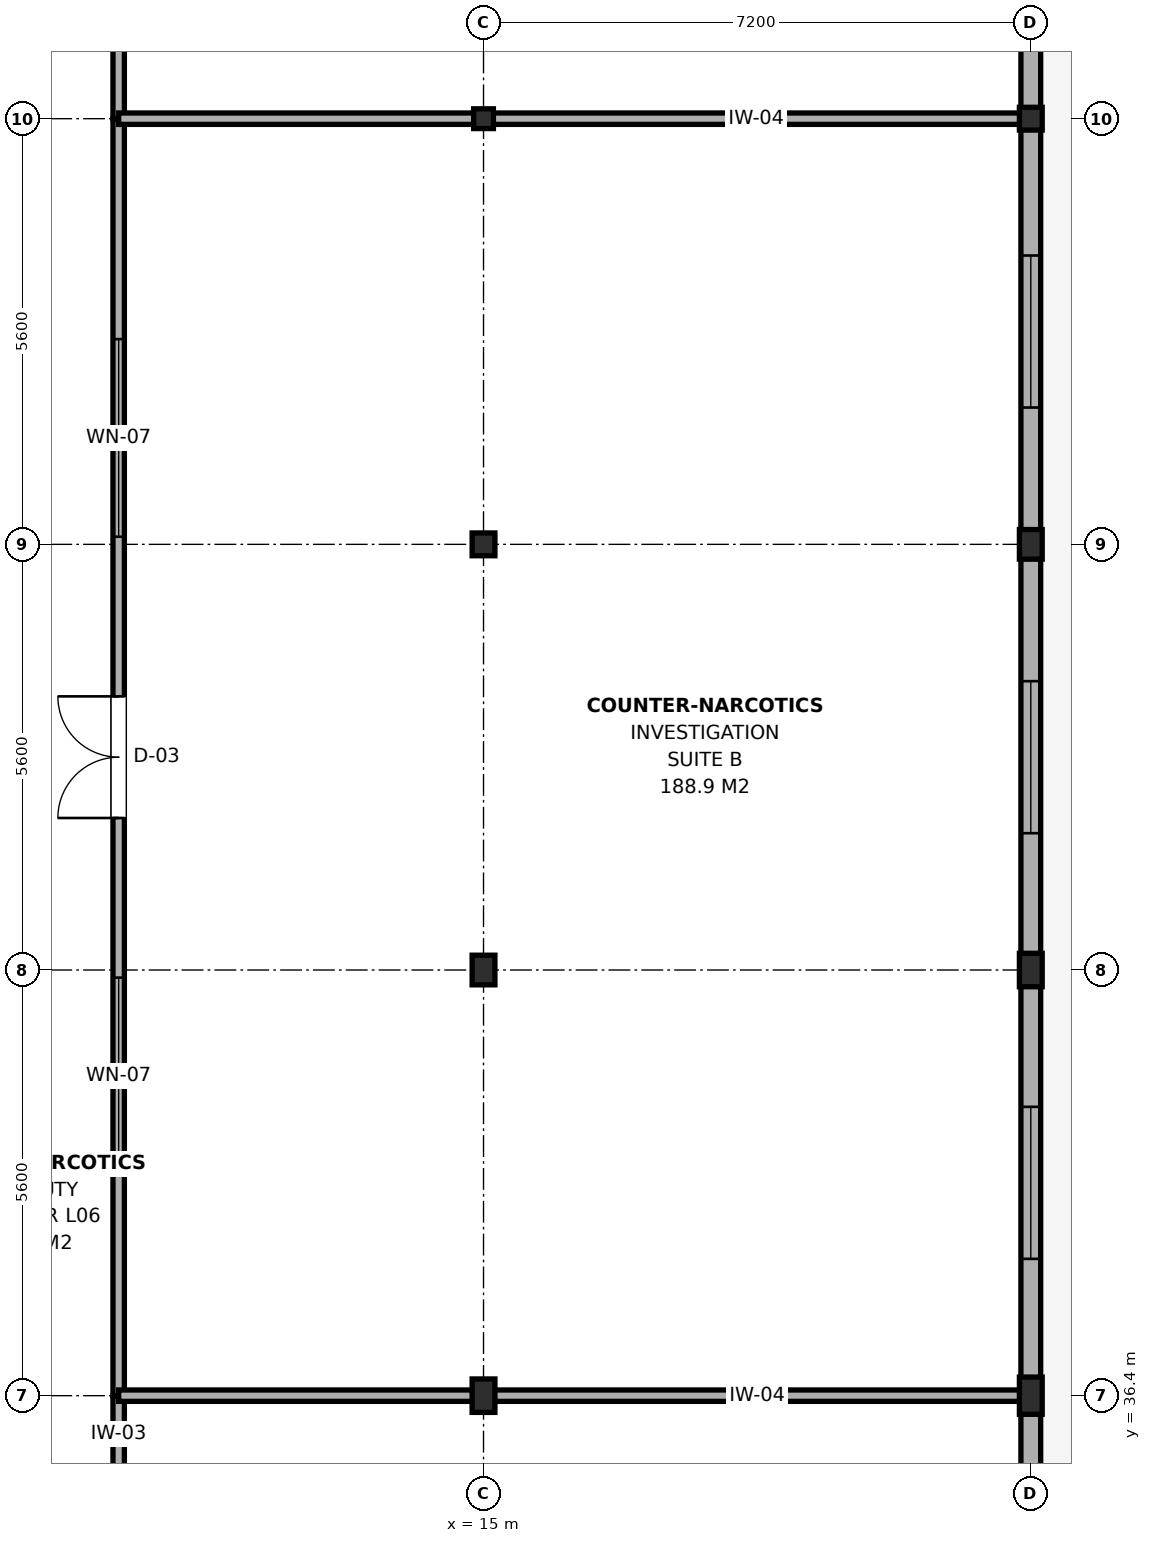
"""IFC4 building model, lengths in metres.
Left out: names, types, materials, properties, quantities, classifications, styles, units other than length and angle.
Written with IfcOpenShell. Run it as: python <this file> out.ifc"""

import sys

from ifc_helpers import new_model, si_unit, direction, frame, frame_2d, origin, origin_2d, place, context, subcontext, project, spatial, rectangle, i_section, extrude, element, fill, save


model = new_model("IFC4")
c1 = context("Model", 3, precision=1e-05, world=origin(), true_north=direction((0.0, 1.0)))
c2 = subcontext(c1, "Body", "Model", "MODEL_VIEW")
j1 = project(units=[si_unit("LENGTHUNIT", "METRE"), si_unit("PLANEANGLEUNIT", "RADIAN")], contexts=[c1])
p1 = place(None, origin())
s1 = spatial("IfcSite", under=j1, at=p1, CompositionType="ELEMENT")
p2 = place(p1, origin())
s2 = spatial("IfcBuilding", under=s1, at=p2, CompositionType="ELEMENT")
p3 = place(p2, frame((0.0, 0.0, 24.9)))
s3 = spatial("IfcBuildingStorey", under=s2, at=p3, CompositionType="ELEMENT", Elevation=24.9)
p4 = place(p3, frame((15.0, 36.4, 0.0), z_axis=(0.0, 0.0, 1.0), x_axis=(1.0, 0.0, 0.0)))
e1 = element("IfcColumn", 1, at=p4, inside=s3, PredefinedType="COLUMN", context=c2, shape_type="SweptSolid", body=[
    extrude(i_section(OverallWidth=0.3, OverallDepth=0.44, WebThickness=0.011, FlangeThickness=0.021, FilletRadius=0.027, at=origin_2d()), origin(), (0.0, 0.0, 1.0), 3.9),
])
p5 = place(p3, frame((15.0, 42.0, 0.0), z_axis=(0.0, 0.0, 1.0), x_axis=(1.0, 0.0, 0.0)))
e2 = element("IfcColumn", 2, at=p5, inside=s3, PredefinedType="COLUMN", context=c2, shape_type="SweptSolid", body=[
    extrude(i_section(OverallWidth=0.3, OverallDepth=0.39, WebThickness=0.011, FlangeThickness=0.019, FilletRadius=0.027, at=origin_2d()), origin(), (0.0, 0.0, 1.0), 3.9),
])
p6 = place(p3, frame((15.0, 47.6, 0.0), z_axis=(0.0, 0.0, 1.0), x_axis=(1.0, 0.0, 0.0)))
e3 = element("IfcColumn", 3, at=p6, inside=s3, PredefinedType="COLUMN", context=c2, shape_type="SweptSolid", body=[
    extrude(i_section(OverallWidth=0.3, OverallDepth=0.3, WebThickness=0.011, FlangeThickness=0.019, FilletRadius=0.027, at=origin_2d()), origin(), (0.0, 0.0, 1.0), 3.9),
])
p7 = place(p3, frame((15.0, 53.2, 0.0), z_axis=(0.0, 0.0, 1.0), x_axis=(1.0, 0.0, 0.0)))
e4 = element("IfcColumn", 4, at=p7, inside=s3, PredefinedType="COLUMN", context=c2, shape_type="SweptSolid", body=[
    extrude(i_section(OverallWidth=0.26, OverallDepth=0.26, WebThickness=0.01, FlangeThickness=0.018, FilletRadius=0.024, at=origin_2d()), origin(), (0.0, 0.0, 1.0), 3.9),
])
p8 = place(p3, frame((22.2, 36.4, 0.0), z_axis=(0.0, 0.0, 1.0), x_axis=(1.0, 0.0, 0.0)))
e5 = element("IfcColumn", 5, at=p8, inside=s3, PredefinedType="COLUMN", context=c2, shape_type="SweptSolid", body=[
    extrude(i_section(OverallWidth=0.3, OverallDepth=0.49, WebThickness=0.012, FlangeThickness=0.023, FilletRadius=0.027, at=origin_2d()), origin(), (0.0, 0.0, 1.0), 3.9),
])
p9 = place(p3, frame((22.2, 42.0, 0.0), z_axis=(0.0, 0.0, 1.0), x_axis=(1.0, 0.0, 0.0)))
e6 = element("IfcColumn", 6, at=p9, inside=s3, PredefinedType="COLUMN", context=c2, shape_type="SweptSolid", body=[
    extrude(i_section(OverallWidth=0.3, OverallDepth=0.44, WebThickness=0.011, FlangeThickness=0.021, FilletRadius=0.027, at=origin_2d()), origin(), (0.0, 0.0, 1.0), 3.9),
])
p10 = place(p3, frame((22.2, 47.6, 0.0), z_axis=(0.0, 0.0, 1.0), x_axis=(1.0, 0.0, 0.0)))
e7 = element("IfcColumn", 7, at=p10, inside=s3, PredefinedType="COLUMN", context=c2, shape_type="SweptSolid", body=[
    extrude(i_section(OverallWidth=0.3, OverallDepth=0.39, WebThickness=0.011, FlangeThickness=0.019, FilletRadius=0.027, at=origin_2d()), origin(), (0.0, 0.0, 1.0), 3.9),
])
p11 = place(p3, frame((22.2, 53.2, 0.0), z_axis=(0.0, 0.0, 1.0), x_axis=(1.0, 0.0, 0.0)))
e8 = element("IfcColumn", 8, at=p11, inside=s3, PredefinedType="COLUMN", context=c2, shape_type="SweptSolid", body=[
    extrude(i_section(OverallWidth=0.3, OverallDepth=0.3, WebThickness=0.011, FlangeThickness=0.019, FilletRadius=0.027, at=origin_2d()), origin(), (0.0, 0.0, 1.0), 3.9),
])
p12 = place(p3, frame((22.2, 30.8, 0.0), z_axis=(0.0, 0.0, 1.0), x_axis=(0.0, 1.0, 0.0)))
e9 = element("IfcWall", 9, at=p12, inside=s3, PredefinedType="SOLIDWALL", context=c2, shape_type="SweptSolid", body=[
    extrude(rectangle(XDim=5.6, YDim=0.26, at=frame_2d((2.8, 0.0))), origin(), (0.0, 0.0, 1.0), 3.115),
])
p13 = place(p12, frame((1.8, 0.0, 0.9)))
e10 = element("IfcOpeningElement", 10, at=p13, cuts=e9, PredefinedType="OPENING", context=c2, shape_type="SweptSolid", body=[
    extrude(rectangle(XDim=2.0, YDim=1.8, at=frame_2d((1.0, 0.9))), frame((0.0, 0.145, 0.0), z_axis=(0.0, -1.0, 0.0), x_axis=(1.0, 0.0, 0.0)), (0.0, 0.0, 1.0), 0.29),
])
p14 = place(p3, frame((22.2, 36.4, 0.0), z_axis=(0.0, 0.0, 1.0), x_axis=(0.0, 1.0, 0.0)))
e11 = element("IfcWall", 11, at=p14, inside=s3, PredefinedType="SOLIDWALL", context=c2, shape_type="SweptSolid", body=[
    extrude(rectangle(XDim=5.6, YDim=0.26, at=frame_2d((2.8, 0.0))), origin(), (0.0, 0.0, 1.0), 3.115),
])
p15 = place(p14, frame((1.8, 0.0, 0.9)))
e12 = element("IfcOpeningElement", 12, at=p15, cuts=e11, PredefinedType="OPENING", context=c2, shape_type="SweptSolid", body=[
    extrude(rectangle(XDim=2.0, YDim=1.8, at=frame_2d((1.0, 0.9))), frame((0.0, 0.145, 0.0), z_axis=(0.0, -1.0, 0.0), x_axis=(1.0, 0.0, 0.0)), (0.0, 0.0, 1.0), 0.29),
])
p16 = place(p3, frame((22.2, 42.0, 0.0), z_axis=(0.0, 0.0, 1.0), x_axis=(0.0, 1.0, 0.0)))
e13 = element("IfcWall", 13, at=p16, inside=s3, PredefinedType="SOLIDWALL", context=c2, shape_type="SweptSolid", body=[
    extrude(rectangle(XDim=5.6, YDim=0.26, at=frame_2d((2.8, 0.0))), origin(), (0.0, 0.0, 1.0), 3.115),
])
p17 = place(p16, frame((1.8, 0.0, 0.9)))
e14 = element("IfcOpeningElement", 14, at=p17, cuts=e13, PredefinedType="OPENING", context=c2, shape_type="SweptSolid", body=[
    extrude(rectangle(XDim=2.0, YDim=1.8, at=frame_2d((1.0, 0.9))), frame((0.0, 0.145, 0.0), z_axis=(0.0, -1.0, 0.0), x_axis=(1.0, 0.0, 0.0)), (0.0, 0.0, 1.0), 0.29),
])
p18 = place(p3, frame((22.2, 47.6, 0.0), z_axis=(0.0, 0.0, 1.0), x_axis=(0.0, 1.0, 0.0)))
e15 = element("IfcWall", 15, at=p18, inside=s3, PredefinedType="SOLIDWALL", context=c2, shape_type="SweptSolid", body=[
    extrude(rectangle(XDim=5.6, YDim=0.26, at=frame_2d((2.8, 0.0))), origin(), (0.0, 0.0, 1.0), 3.165),
])
p19 = place(p18, frame((1.8, 0.0, 0.9)))
e16 = element("IfcOpeningElement", 16, at=p19, cuts=e15, PredefinedType="OPENING", context=c2, shape_type="SweptSolid", body=[
    extrude(rectangle(XDim=2.0, YDim=1.8, at=frame_2d((1.0, 0.9))), frame((0.0, 0.145, 0.0), z_axis=(0.0, -1.0, 0.0), x_axis=(1.0, 0.0, 0.0)), (0.0, 0.0, 1.0), 0.29),
])
p20 = place(p3, frame((22.2, 53.2, 0.0), z_axis=(0.0, 0.0, 1.0), x_axis=(0.0, 1.0, 0.0)))
e17 = element("IfcWall", 17, at=p20, inside=s3, PredefinedType="SOLIDWALL", context=c2, shape_type="SweptSolid", body=[
    extrude(rectangle(XDim=5.6, YDim=0.26, at=frame_2d((2.8, 0.0))), origin(), (0.0, 0.0, 1.0), 3.215),
])
p21 = place(p20, frame((1.8, 0.0, 0.9)))
e18 = element("IfcOpeningElement", 18, at=p21, cuts=e17, PredefinedType="OPENING", context=c2, shape_type="SweptSolid", body=[
    extrude(rectangle(XDim=2.0, YDim=1.8, at=frame_2d((1.0, 0.9))), frame((0.0, 0.145, 0.0), z_axis=(0.0, -1.0, 0.0), x_axis=(1.0, 0.0, 0.0)), (0.0, 0.0, 1.0), 0.29),
])
p22 = place(p3, frame((10.2, 17.56, 0.0), z_axis=(0.0, 0.0, 1.0), x_axis=(0.0, 1.0, 0.0)))
e19 = element("IfcWall", 19, at=p22, inside=s3, PredefinedType="PARTITIONING", context=c2, shape_type="SweptSolid", body=[
    extrude(rectangle(XDim=18.84, YDim=0.15, at=frame_2d((9.42, 0.0))), origin(), (0.0, 0.0, 1.0), 3.165),
])
p23 = place(p22, frame((8.62, 0.0, 0.0)))
e20 = element("IfcOpeningElement", 20, at=p23, cuts=e19, PredefinedType="OPENING", context=c2, shape_type="SweptSolid", body=[
    extrude(rectangle(XDim=1.6, YDim=2.15, at=frame_2d((0.8, 1.075))), frame((0.0, 0.09, 0.0), z_axis=(0.0, -1.0, 0.0), x_axis=(1.0, 0.0, 0.0)), (0.0, 0.0, 1.0), 0.18),
])
p24 = place(p22, frame((3.41, 0.0, 0.95)))
e21 = element("IfcOpeningElement", 21, at=p24, cuts=e19, PredefinedType="OPENING", context=c2, shape_type="SweptSolid", body=[
    extrude(rectangle(XDim=2.6, YDim=1.5, at=frame_2d((1.3, 0.75))), frame((0.0, 0.09, 0.0), z_axis=(0.0, -1.0, 0.0), x_axis=(1.0, 0.0, 0.0)), (0.0, 0.0, 1.0), 0.18),
])
p25 = place(p22, frame((12.83, 0.0, 0.95)))
e22 = element("IfcOpeningElement", 22, at=p25, cuts=e19, PredefinedType="OPENING", context=c2, shape_type="SweptSolid", body=[
    extrude(rectangle(XDim=2.6, YDim=1.5, at=frame_2d((1.3, 0.75))), frame((0.0, 0.09, 0.0), z_axis=(0.0, -1.0, 0.0), x_axis=(1.0, 0.0, 0.0)), (0.0, 0.0, 1.0), 0.18),
])
p26 = place(p3, frame((10.2, 36.4, 0.0), z_axis=(0.0, 0.0, 1.0), x_axis=(0.0, 1.0, 0.0)))
e23 = element("IfcWall", 23, at=p26, inside=s3, PredefinedType="PARTITIONING", context=c2, shape_type="SweptSolid", body=[
    extrude(rectangle(XDim=16.8, YDim=0.15, at=frame_2d((8.4, 0.0))), origin(), (0.0, 0.0, 1.0), 3.165),
])
p27 = place(p26, frame((7.6, 0.0, 0.0)))
e24 = element("IfcOpeningElement", 24, at=p27, cuts=e23, PredefinedType="OPENING", context=c2, shape_type="SweptSolid", body=[
    extrude(rectangle(XDim=1.6, YDim=2.15, at=frame_2d((0.8, 1.075))), frame((0.0, 0.09, 0.0), z_axis=(0.0, -1.0, 0.0), x_axis=(1.0, 0.0, 0.0)), (0.0, 0.0, 1.0), 0.18),
])
p28 = place(p26, frame((2.9, 0.0, 0.95)))
e25 = element("IfcOpeningElement", 25, at=p28, cuts=e23, PredefinedType="OPENING", context=c2, shape_type="SweptSolid", body=[
    extrude(rectangle(XDim=2.6, YDim=1.5, at=frame_2d((1.3, 0.75))), frame((0.0, 0.09, 0.0), z_axis=(0.0, -1.0, 0.0), x_axis=(1.0, 0.0, 0.0)), (0.0, 0.0, 1.0), 0.18),
])
p29 = place(p26, frame((11.3, 0.0, 0.95)))
e26 = element("IfcOpeningElement", 26, at=p29, cuts=e23, PredefinedType="OPENING", context=c2, shape_type="SweptSolid", body=[
    extrude(rectangle(XDim=2.6, YDim=1.5, at=frame_2d((1.3, 0.75))), frame((0.0, 0.09, 0.0), z_axis=(0.0, -1.0, 0.0), x_axis=(1.0, 0.0, 0.0)), (0.0, 0.0, 1.0), 0.18),
])
p30 = place(p3, frame((10.2, 36.4, 0.0), z_axis=(0.0, 0.0, 1.0), x_axis=(1.0, 0.0, 0.0)))
e27 = element("IfcWall", 27, at=p30, inside=s3, PredefinedType="PARTITIONING", context=c2, shape_type="SweptSolid", body=[
    extrude(rectangle(XDim=11.86, YDim=0.15, at=frame_2d((5.93, 0.0))), origin(), (0.0, 0.0, 1.0), 3.365),
])
p31 = place(p3, frame((10.2, 53.2, 0.0), z_axis=(0.0, 0.0, 1.0), x_axis=(0.0, 1.0, 0.0)))
e28 = element("IfcWall", 28, at=p31, inside=s3, PredefinedType="PARTITIONING", context=c2, shape_type="SweptSolid", body=[
    extrude(rectangle(XDim=20.6, YDim=0.15, at=frame_2d((10.3, 0.0))), origin(), (0.0, 0.0, 1.0), 3.165),
])
p32 = place(p31, frame((9.5, 0.0, 0.0)))
e29 = element("IfcOpeningElement", 29, at=p32, cuts=e28, PredefinedType="OPENING", context=c2, shape_type="SweptSolid", body=[
    extrude(rectangle(XDim=1.6, YDim=2.15, at=frame_2d((0.8, 1.075))), frame((0.0, 0.09, 0.0), z_axis=(0.0, -1.0, 0.0), x_axis=(1.0, 0.0, 0.0)), (0.0, 0.0, 1.0), 0.18),
])
p33 = place(p31, frame((3.85, 0.0, 0.95)))
e30 = element("IfcOpeningElement", 30, at=p33, cuts=e28, PredefinedType="OPENING", context=c2, shape_type="SweptSolid", body=[
    extrude(rectangle(XDim=2.6, YDim=1.5, at=frame_2d((1.3, 0.75))), frame((0.0, 0.09, 0.0), z_axis=(0.0, -1.0, 0.0), x_axis=(1.0, 0.0, 0.0)), (0.0, 0.0, 1.0), 0.18),
])
p34 = place(p31, frame((14.15, 0.0, 0.95)))
e31 = element("IfcOpeningElement", 31, at=p34, cuts=e28, PredefinedType="OPENING", context=c2, shape_type="SweptSolid", body=[
    extrude(rectangle(XDim=2.6, YDim=1.5, at=frame_2d((1.3, 0.75))), frame((0.0, 0.09, 0.0), z_axis=(0.0, -1.0, 0.0), x_axis=(1.0, 0.0, 0.0)), (0.0, 0.0, 1.0), 0.18),
])
p35 = place(p3, frame((10.2, 53.2, 0.0), z_axis=(0.0, 0.0, 1.0), x_axis=(1.0, 0.0, 0.0)))
e32 = element("IfcWall", 32, at=p35, inside=s3, PredefinedType="PARTITIONING", context=c2, shape_type="SweptSolid", body=[
    extrude(rectangle(XDim=11.86, YDim=0.15, at=frame_2d((5.93, 0.0))), origin(), (0.0, 0.0, 1.0), 3.165),
])
p36 = place(p15, origin())
e33 = element("IfcWindow", 33, at=p36, inside=s3, PartitioningType="SINGLE_PANEL", PredefinedType="WINDOW", context=c2, shape_type="SweptSolid", body=[
    extrude(rectangle(XDim=2.0, YDim=1.8, at=frame_2d((1.0, 0.9))), frame((0.0, 0.03, 0.0), z_axis=(0.0, -1.0, 0.0), x_axis=(1.0, 0.0, 0.0)), (0.0, 0.0, 1.0), 0.06),
])
fill(e12, e33)
p37 = place(p17, origin())
e34 = element("IfcWindow", 34, at=p37, inside=s3, PartitioningType="SINGLE_PANEL", PredefinedType="WINDOW", context=c2, shape_type="SweptSolid", body=[
    extrude(rectangle(XDim=2.0, YDim=1.8, at=frame_2d((1.0, 0.9))), frame((0.0, 0.03, 0.0), z_axis=(0.0, -1.0, 0.0), x_axis=(1.0, 0.0, 0.0)), (0.0, 0.0, 1.0), 0.06),
])
fill(e14, e34)
p38 = place(p19, origin())
e35 = element("IfcWindow", 35, at=p38, inside=s3, PartitioningType="SINGLE_PANEL", PredefinedType="WINDOW", context=c2, shape_type="SweptSolid", body=[
    extrude(rectangle(XDim=2.0, YDim=1.8, at=frame_2d((1.0, 0.9))), frame((0.0, 0.03, 0.0), z_axis=(0.0, -1.0, 0.0), x_axis=(1.0, 0.0, 0.0)), (0.0, 0.0, 1.0), 0.06),
])
fill(e16, e35)
p39 = place(p27, origin())
e36 = element("IfcDoor", 36, at=p39, inside=s3, OperationType="DOUBLE_DOOR_SINGLE_SWING", PredefinedType="DOOR", context=c2, shape_type="SweptSolid", body=[
    extrude(rectangle(XDim=1.6, YDim=2.15, at=frame_2d((0.8, 1.075))), frame((0.0, 0.025, 0.0), z_axis=(0.0, -1.0, 0.0), x_axis=(1.0, 0.0, 0.0)), (0.0, 0.0, 1.0), 0.05),
])
fill(e24, e36)
p40 = place(p28, origin())
e37 = element("IfcWindow", 37, at=p40, inside=s3, PartitioningType="SINGLE_PANEL", PredefinedType="WINDOW", context=c2, shape_type="SweptSolid", body=[
    extrude(rectangle(XDim=2.6, YDim=1.5, at=frame_2d((1.3, 0.75))), frame((0.0, 0.03, 0.0), z_axis=(0.0, -1.0, 0.0), x_axis=(1.0, 0.0, 0.0)), (0.0, 0.0, 1.0), 0.06),
])
fill(e25, e37)
p41 = place(p29, origin())
e38 = element("IfcWindow", 38, at=p41, inside=s3, PartitioningType="SINGLE_PANEL", PredefinedType="WINDOW", context=c2, shape_type="SweptSolid", body=[
    extrude(rectangle(XDim=2.6, YDim=1.5, at=frame_2d((1.3, 0.75))), frame((0.0, 0.03, 0.0), z_axis=(0.0, -1.0, 0.0), x_axis=(1.0, 0.0, 0.0)), (0.0, 0.0, 1.0), 0.06),
])
fill(e26, e38)
save(model, sys.argv[1])
